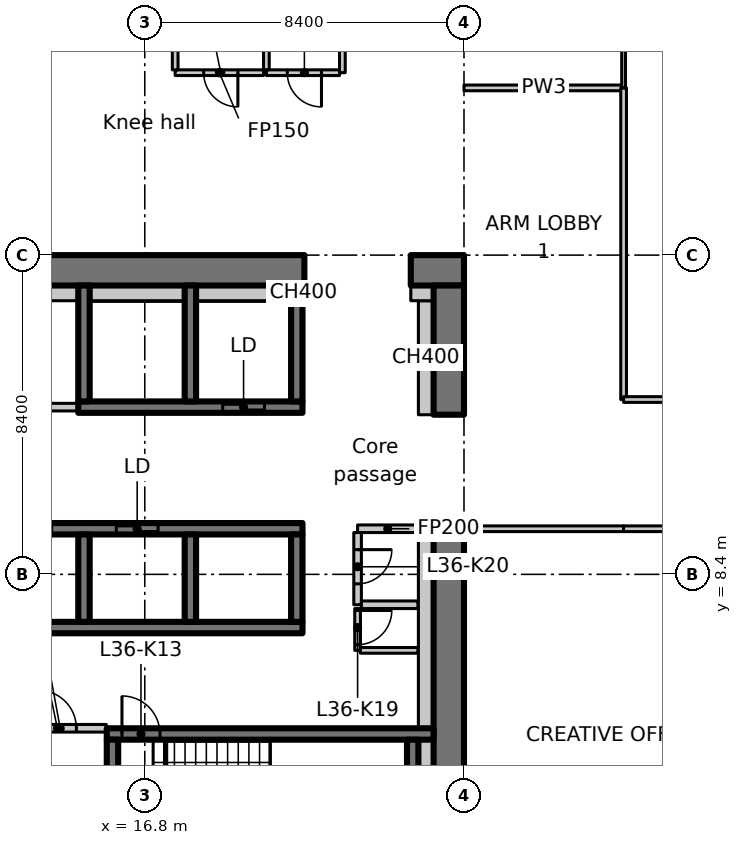
"""IFC4 building model, lengths in metres.
Left out: names, types, materials, properties, quantities, classifications, styles, units other than length and angle.
Written with IfcOpenShell. Run it as: python <this file> out.ifc"""

import sys

from ifc_helpers import new_model, si_unit, direction, frame, frame_2d, origin, place, context, subcontext, project, spatial, polyline, rectangle, outline, extrude, element, fill, save


model = new_model("IFC4")
c1 = context("Model", 3, precision=1e-05, world=origin(), true_north=direction((0.0, 1.0)))
c2 = subcontext(c1, "Body", "Model", "MODEL_VIEW")
j1 = project(units=[si_unit("LENGTHUNIT", "METRE"), si_unit("PLANEANGLEUNIT", "RADIAN")], contexts=[c1])
p1 = place(None, origin())
s1 = spatial("IfcSite", under=j1, at=p1, CompositionType="ELEMENT")
p2 = place(p1, origin())
s2 = spatial("IfcBuilding", under=s1, at=p2, CompositionType="ELEMENT")
p3 = place(p2, frame((0.0, 0.0, 145.7)))
s3 = spatial("IfcBuildingStorey", under=s2, at=p3, CompositionType="ELEMENT", Elevation=145.7)
p4 = place(p3, frame((-1.1, 16.4, 0.0), z_axis=(0.0, 0.0, 1.0), x_axis=(1.0, 0.0, 0.0)))
e1 = element("IfcWall", 1, at=p4, inside=s3, PredefinedType="SHEAR", context=c2, shape_type="SweptSolid", body=[
    extrude(rectangle(XDim=22.1, YDim=0.8, at=frame_2d((11.05, 0.0))), origin(), (0.0, 0.0, 1.0), 3.35),
])
p5 = place(p4, frame((3.15, 0.0, 0.0)))
e2 = element("IfcOpeningElement", 2, at=p5, cuts=e1, PredefinedType="OPENING", context=c2, shape_type="SweptSolid", body=[
    extrude(rectangle(XDim=1.1, YDim=2.3, at=frame_2d((0.55, 1.15))), frame((0.0, 0.41, 0.0), z_axis=(0.0, -1.0, 0.0), x_axis=(1.0, 0.0, 0.0)), (0.0, 0.0, 1.0), 0.82),
])
p6 = place(p3, frame((23.8, 16.4, 0.0), z_axis=(0.0, 0.0, 1.0), x_axis=(1.0, 0.0, 0.0)))
e3 = element("IfcWall", 3, at=p6, inside=s3, PredefinedType="SHEAR", context=c2, shape_type="SweptSolid", body=[
    extrude(rectangle(XDim=1.4, YDim=0.8, at=frame_2d((0.7, 0.0))), origin(), (0.0, 0.0, 1.0), 3.35),
])
p7 = place(p3, frame((24.8, 0.8, 0.0), z_axis=(0.0, 0.0, 1.0), x_axis=(0.0, 1.0, 0.0)))
e4 = element("IfcWall", 4, at=p7, inside=s3, PredefinedType="SHEAR", context=c2, shape_type="SweptSolid", body=[
    extrude(rectangle(XDim=9.0, YDim=0.8, at=frame_2d((4.5, 0.0))), origin(), (0.0, 0.0, 1.0), 3.35),
])
p8 = place(p3, frame((24.8, 12.6, 0.0), z_axis=(0.0, 0.0, 1.0), x_axis=(0.0, 1.0, 0.0)))
e5 = element("IfcWall", 5, at=p8, inside=s3, PredefinedType="SHEAR", context=c2, shape_type="SweptSolid", body=[
    extrude(rectangle(XDim=3.4, YDim=0.8, at=frame_2d((1.7, 0.0))), origin(), (0.0, 0.0, 1.0), 3.35),
])
p9 = place(p3, frame((24.2, 12.6, 0.0), z_axis=(0.0, 0.0, 1.0), x_axis=(0.0, 1.0, 0.0)))
e6 = element("IfcWall", 6, at=p9, inside=s3, PredefinedType="PARTITIONING", context=c2, shape_type="SweptSolid", body=[
    extrude(rectangle(XDim=3.0, YDim=0.4, at=frame_2d((1.5, 0.0))), origin(), (0.0, 0.0, 1.0), 3.35),
])
p10 = place(p3, frame((23.8, 15.8, 0.0), z_axis=(0.0, 0.0, 1.0), x_axis=(1.0, 0.0, 0.0)))
e7 = element("IfcWall", 7, at=p10, inside=s3, PredefinedType="PARTITIONING", context=c2, shape_type="SweptSolid", body=[
    extrude(rectangle(XDim=0.6, YDim=0.4, at=frame_2d((0.3, 0.0))), origin(), (0.0, 0.0, 1.0), 3.35),
])
p11 = place(p3, frame((0.8, 7.0, 0.0), z_axis=(0.0, 0.0, 1.0), x_axis=(1.0, 0.0, 0.0)))
e8 = element("IfcWall", 8, at=p11, inside=s3, PredefinedType="SHEAR", context=c2, shape_type="SweptSolid", body=[
    extrude(rectangle(XDim=20.15, YDim=0.3, at=frame_2d((10.075, 0.0))), origin(), (0.0, 0.0, 1.0), 3.35),
])
p12 = place(p3, frame((0.8, 9.6, 0.0), z_axis=(0.0, 0.0, 1.0), x_axis=(1.0, 0.0, 0.0)))
e9 = element("IfcWall", 9, at=p12, inside=s3, PredefinedType="SHEAR", context=c2, shape_type="SweptSolid", body=[
    extrude(rectangle(XDim=20.15, YDim=0.3, at=frame_2d((10.075, 0.0))), origin(), (0.0, 0.0, 1.0), 3.35),
])
p13 = place(p12, frame((1.25, 0.0, 0.0)))
e10 = element("IfcOpeningElement", 10, at=p13, cuts=e9, PredefinedType="OPENING", context=c2, shape_type="SweptSolid", body=[
    extrude(rectangle(XDim=1.1, YDim=2.3, at=frame_2d((0.55, 1.15))), frame((0.0, 0.16, 0.0), z_axis=(0.0, -1.0, 0.0), x_axis=(1.0, 0.0, 0.0)), (0.0, 0.0, 1.0), 0.32),
])
p14 = place(p12, frame((4.05, 0.0, 0.0)))
e11 = element("IfcOpeningElement", 11, at=p14, cuts=e9, PredefinedType="OPENING", context=c2, shape_type="SweptSolid", body=[
    extrude(rectangle(XDim=1.1, YDim=2.3, at=frame_2d((0.55, 1.15))), frame((0.0, 0.16, 0.0), z_axis=(0.0, -1.0, 0.0), x_axis=(1.0, 0.0, 0.0)), (0.0, 0.0, 1.0), 0.32),
])
p15 = place(p12, frame((6.85, 0.0, 0.0)))
e12 = element("IfcOpeningElement", 12, at=p15, cuts=e9, PredefinedType="OPENING", context=c2, shape_type="SweptSolid", body=[
    extrude(rectangle(XDim=1.1, YDim=2.3, at=frame_2d((0.55, 1.15))), frame((0.0, 0.16, 0.0), z_axis=(0.0, -1.0, 0.0), x_axis=(1.0, 0.0, 0.0)), (0.0, 0.0, 1.0), 0.32),
])
p16 = place(p12, frame((9.65, 0.0, 0.0)))
e13 = element("IfcOpeningElement", 13, at=p16, cuts=e9, PredefinedType="OPENING", context=c2, shape_type="SweptSolid", body=[
    extrude(rectangle(XDim=1.1, YDim=2.3, at=frame_2d((0.55, 1.15))), frame((0.0, 0.16, 0.0), z_axis=(0.0, -1.0, 0.0), x_axis=(1.0, 0.0, 0.0)), (0.0, 0.0, 1.0), 0.32),
])
p17 = place(p12, frame((12.45, 0.0, 0.0)))
e14 = element("IfcOpeningElement", 14, at=p17, cuts=e9, PredefinedType="OPENING", context=c2, shape_type="SweptSolid", body=[
    extrude(rectangle(XDim=1.1, YDim=2.3, at=frame_2d((0.55, 1.15))), frame((0.0, 0.16, 0.0), z_axis=(0.0, -1.0, 0.0), x_axis=(1.0, 0.0, 0.0)), (0.0, 0.0, 1.0), 0.32),
])
p18 = place(p12, frame((15.25, 0.0, 0.0)))
e15 = element("IfcOpeningElement", 15, at=p18, cuts=e9, PredefinedType="OPENING", context=c2, shape_type="SweptSolid", body=[
    extrude(rectangle(XDim=1.1, YDim=2.3, at=frame_2d((0.55, 1.15))), frame((0.0, 0.16, 0.0), z_axis=(0.0, -1.0, 0.0), x_axis=(1.0, 0.0, 0.0)), (0.0, 0.0, 1.0), 0.32),
])
for number, where, z_axis, x_axis in (
    (16, (15.2, 7.15, 0.0), (0.0, 0.0, 1.0), (0.0, 1.0, 0.0)),
    (17, (18.0, 7.15, 0.0), (0.0, 0.0, 1.0), (0.0, 1.0, 0.0)),
    (18, (20.8, 7.15, 0.0), (0.0, 0.0, 1.0), (0.0, 1.0, 0.0)),
):
    element("IfcWall", number, at=place(p3, frame(where, z_axis=z_axis, x_axis=x_axis)), inside=s3, PredefinedType="SHEAR", context=c2, shape_type="SweptSolid", body=[
        extrude(rectangle(XDim=2.3, YDim=0.3, at=frame_2d((1.15, 0.0))), origin(), (0.0, 0.0, 1.0), 3.35),
    ])
p19 = place(p3, frame((15.05, 12.8, 0.0), z_axis=(0.0, 0.0, 1.0), x_axis=(1.0, 0.0, 0.0)))
e19 = element("IfcWall", 19, at=p19, inside=s3, PredefinedType="SHEAR", context=c2, shape_type="SweptSolid", body=[
    extrude(rectangle(XDim=5.9, YDim=0.3, at=frame_2d((2.95, 0.0))), origin(), (0.0, 0.0, 1.0), 3.35),
])
p20 = place(p19, frame((3.8, 0.0, 0.0)))
e20 = element("IfcOpeningElement", 20, at=p20, cuts=e19, PredefinedType="OPENING", context=c2, shape_type="SweptSolid", body=[
    extrude(rectangle(XDim=1.1, YDim=2.3, at=frame_2d((0.55, 1.15))), frame((0.0, 0.16, 0.0), z_axis=(0.0, -1.0, 0.0), x_axis=(1.0, 0.0, 0.0)), (0.0, 0.0, 1.0), 0.32),
])
for number, where, z_axis, x_axis in (
    (21, (15.2, 12.95, 0.0), (0.0, 0.0, 1.0), (0.0, 1.0, 0.0)),
    (22, (18.0, 12.95, 0.0), (0.0, 0.0, 1.0), (0.0, 1.0, 0.0)),
    (23, (20.8, 12.95, 0.0), (0.0, 0.0, 1.0), (0.0, 1.0, 0.0)),
):
    element("IfcWall", number, at=place(p3, frame(where, z_axis=z_axis, x_axis=x_axis)), inside=s3, PredefinedType="SHEAR", context=c2, shape_type="SweptSolid", body=[
        extrude(rectangle(XDim=3.05, YDim=0.3, at=frame_2d((1.525, 0.0))), origin(), (0.0, 0.0, 1.0), 3.35),
    ])
p21 = place(p3, frame((15.8, 4.2, 0.0), z_axis=(0.0, 0.0, 1.0), x_axis=(1.0, 0.0, 0.0)))
e24 = element("IfcWall", 24, at=p21, inside=s3, PredefinedType="SHEAR", context=c2, shape_type="SweptSolid", body=[
    extrude(rectangle(XDim=8.6, YDim=0.3, at=frame_2d((4.3, 0.0))), origin(), (0.0, 0.0, 1.0), 3.35),
])
p22 = place(p21, frame((0.4, 0.0, 0.0)))
e25 = element("IfcOpeningElement", 25, at=p22, cuts=e24, PredefinedType="OPENING", context=c2, shape_type="SweptSolid", body=[
    extrude(rectangle(XDim=1.0, YDim=2.1, at=frame_2d((0.5, 1.05))), frame((0.0, 0.16, 0.0), z_axis=(0.0, -1.0, 0.0), x_axis=(1.0, 0.0, 0.0)), (0.0, 0.0, 1.0), 0.32),
])
p23 = place(p3, frame((15.95, 1.5, 0.0), z_axis=(0.0, 0.0, 1.0), x_axis=(0.0, 1.0, 0.0)))
e26 = element("IfcWall", 26, at=p23, inside=s3, PredefinedType="SHEAR", context=c2, shape_type="SweptSolid", body=[
    extrude(rectangle(XDim=2.55, YDim=0.3, at=frame_2d((1.275, 0.0))), origin(), (0.0, 0.0, 1.0), 3.35),
])
p24 = place(p23, frame((0.8, 0.0, 0.0)))
e27 = element("IfcOpeningElement", 27, at=p24, cuts=e26, PredefinedType="OPENING", context=c2, shape_type="SweptSolid", body=[
    extrude(rectangle(XDim=1.0, YDim=2.1, at=frame_2d((0.5, 1.05))), frame((0.0, 0.16, 0.0), z_axis=(0.0, -1.0, 0.0), x_axis=(1.0, 0.0, 0.0)), (0.0, 0.0, 1.0), 0.32),
])
p25 = place(p3, frame((23.85, 1.5, 0.0), z_axis=(0.0, 0.0, 1.0), x_axis=(0.0, 1.0, 0.0)))
e28 = element("IfcWall", 28, at=p25, inside=s3, PredefinedType="SHEAR", context=c2, shape_type="SweptSolid", body=[
    extrude(rectangle(XDim=2.55, YDim=0.3, at=frame_2d((1.275, 0.0))), origin(), (0.0, 0.0, 1.0), 3.35),
])
p26 = place(p3, frame((13.362, 4.35, 0.0), z_axis=(0.0, 0.0, 1.0), x_axis=(1.0, 0.0, 0.0)))
e29 = element("IfcWall", 29, at=p26, inside=s3, PredefinedType="PARTITIONING", context=c2, shape_type="SweptSolid", body=[
    extrude(rectangle(XDim=2.426, YDim=0.2, at=frame_2d((1.213, 0.0))), origin(), (0.0, 0.0, 1.0), 3.35),
])
p27 = place(p26, frame((0.638, 0.0, 0.0)))
e30 = element("IfcOpeningElement", 30, at=p27, cuts=e29, PredefinedType="OPENING", context=c2, shape_type="SweptSolid", body=[
    extrude(rectangle(XDim=1.0, YDim=2.1, at=frame_2d((0.5, 1.05))), frame((0.0, 0.11, 0.0), z_axis=(0.0, -1.0, 0.0), x_axis=(1.0, 0.0, 0.0)), (0.0, 0.0, 1.0), 0.22),
])
p28 = place(p3, frame((9.7, 12.8, 0.0), z_axis=(0.0, 0.0, 1.0), x_axis=(1.0, 0.0, 0.0)))
e31 = element("IfcWall", 31, at=p28, inside=s3, PredefinedType="PARTITIONING", context=c2, shape_type="SweptSolid", body=[
    extrude(rectangle(XDim=5.338, YDim=0.2, at=frame_2d((2.669, 0.0))), origin(), (0.0, 0.0, 1.0), 3.35),
])
p29 = place(p28, frame((2.25, 0.0, 0.0)))
e32 = element("IfcOpeningElement", 32, at=p29, cuts=e31, PredefinedType="OPENING", context=c2, shape_type="SweptSolid", body=[
    extrude(rectangle(XDim=0.9, YDim=2.1, at=frame_2d((0.45, 1.05))), frame((0.0, 0.11, 0.0), z_axis=(0.0, -1.0, 0.0), x_axis=(1.0, 0.0, 0.0)), (0.0, 0.0, 1.0), 0.22),
])
p30 = place(p3, frame((23.988, 9.6, 0.0), z_axis=(0.0, 0.0, 1.0), x_axis=(-1.0, 0.0, 0.0)))
e33 = element("IfcWall", 33, at=p30, inside=s3, PredefinedType="PARTITIONING", context=c2, shape_type="SweptSolid", body=[
    extrude(rectangle(XDim=1.588, YDim=0.2, at=frame_2d((0.794, 0.0))), origin(), (0.0, 0.0, 1.0), 3.35),
])
p31 = place(p3, frame((22.4, 9.5, 0.0), z_axis=(0.0, 0.0, 1.0), x_axis=(0.0, -1.0, 0.0)))
e34 = element("IfcWall", 34, at=p31, inside=s3, PredefinedType="PARTITIONING", context=c2, shape_type="SweptSolid", body=[
    extrude(rectangle(XDim=1.9, YDim=0.2, at=frame_2d((0.95, 0.0))), origin(), (0.0, 0.0, 1.0), 3.35),
])
p32 = place(p31, frame((0.45, 0.0, 0.0)))
e35 = element("IfcOpeningElement", 35, at=p32, cuts=e34, PredefinedType="OPENING", context=c2, shape_type="SweptSolid", body=[
    extrude(rectangle(XDim=0.9, YDim=2.1, at=frame_2d((0.45, 1.05))), frame((0.0, 0.11, 0.0), z_axis=(0.0, -1.0, 0.0), x_axis=(1.0, 0.0, 0.0)), (0.0, 0.0, 1.0), 0.22),
])
p33 = place(p3, frame((22.5, 7.6, 0.0), z_axis=(0.0, 0.0, 1.0), x_axis=(1.0, 0.0, 0.0)))
e36 = element("IfcWall", 36, at=p33, inside=s3, PredefinedType="PARTITIONING", context=c2, shape_type="SweptSolid", body=[
    extrude(rectangle(XDim=1.488, YDim=0.2, at=frame_2d((0.744, 0.0))), origin(), (0.0, 0.0, 1.0), 3.35),
])
p34 = place(p3, frame((22.0, 23.925, 0.0), z_axis=(0.0, 0.0, 1.0), x_axis=(0.0, -1.0, 0.0)))
e37 = element("IfcWall", 37, at=p34, inside=s3, PredefinedType="PARTITIONING", context=c2, shape_type="SweptSolid", body=[
    extrude(rectangle(XDim=2.325, YDim=0.15, at=frame_2d((1.163, 0.0))), origin(), (0.0, 0.0, 1.0), 3.35),
])
p35 = place(p3, frame((21.925, 21.6, 0.0), z_axis=(0.0, 0.0, 1.0), x_axis=(-1.0, 0.0, 0.0)))
e38 = element("IfcWall", 38, at=p35, inside=s3, PredefinedType="PARTITIONING", context=c2, shape_type="SweptSolid", body=[
    extrude(rectangle(XDim=1.925, YDim=0.15, at=frame_2d((0.962, 0.0))), origin(), (0.0, 0.0, 1.0), 3.35),
])
p36 = place(p35, frame((0.475, 0.0, 0.0)))
e39 = element("IfcOpeningElement", 39, at=p36, cuts=e38, PredefinedType="OPENING", context=c2, shape_type="SweptSolid", body=[
    extrude(rectangle(XDim=0.9, YDim=2.1, at=frame_2d((0.45, 1.05))), frame((0.0, 0.085, 0.0), z_axis=(0.0, -1.0, 0.0), x_axis=(1.0, 0.0, 0.0)), (0.0, 0.0, 1.0), 0.17),
])
p37 = place(p3, frame((20.0, 21.675, 0.0), z_axis=(0.0, 0.0, 1.0), x_axis=(0.0, 1.0, 0.0)))
e40 = element("IfcWall", 40, at=p37, inside=s3, PredefinedType="PARTITIONING", context=c2, shape_type="SweptSolid", body=[
    extrude(rectangle(XDim=2.25, YDim=0.15, at=frame_2d((1.125, 0.0))), origin(), (0.0, 0.0, 1.0), 3.35),
])
p38 = place(p3, frame((19.925, 21.6, 0.0), z_axis=(0.0, 0.0, 1.0), x_axis=(-1.0, 0.0, 0.0)))
e41 = element("IfcWall", 41, at=p38, inside=s3, PredefinedType="PARTITIONING", context=c2, shape_type="SweptSolid", body=[
    extrude(rectangle(XDim=2.325, YDim=0.15, at=frame_2d((1.163, 0.0))), origin(), (0.0, 0.0, 1.0), 3.35),
])
p39 = place(p38, frame((0.675, 0.0, 0.0)))
e42 = element("IfcOpeningElement", 42, at=p39, cuts=e41, PredefinedType="OPENING", context=c2, shape_type="SweptSolid", body=[
    extrude(rectangle(XDim=0.9, YDim=2.1, at=frame_2d((0.45, 1.05))), frame((0.0, 0.085, 0.0), z_axis=(0.0, -1.0, 0.0), x_axis=(1.0, 0.0, 0.0)), (0.0, 0.0, 1.0), 0.17),
])
p40 = place(p3, frame((17.6, 21.675, 0.0), z_axis=(0.0, 0.0, 1.0), x_axis=(0.0, 1.0, 0.0)))
e43 = element("IfcWall", 43, at=p40, inside=s3, PredefinedType="PARTITIONING", context=c2, shape_type="SweptSolid", body=[
    extrude(rectangle(XDim=2.325, YDim=0.15, at=frame_2d((1.163, 0.0))), origin(), (0.0, 0.0, 1.0), 3.35),
])
p41 = place(p3, frame((22.4, 7.5, 0.0), z_axis=(0.0, 0.0, 1.0), x_axis=(0.0, -1.0, 0.0)))
e44 = element("IfcWall", 44, at=p41, inside=s3, PredefinedType="PARTITIONING", context=c2, shape_type="SweptSolid", body=[
    extrude(rectangle(XDim=1.1, YDim=0.15, at=frame_2d((0.55, 0.0))), origin(), (0.0, 0.0, 1.0), 3.35),
])
p42 = place(p41, frame((0.05, 0.0, 0.0)))
e45 = element("IfcOpeningElement", 45, at=p42, cuts=e44, PredefinedType="OPENING", context=c2, shape_type="SweptSolid", body=[
    extrude(rectangle(XDim=0.9, YDim=2.1, at=frame_2d((0.45, 1.05))), frame((0.0, 0.085, 0.0), z_axis=(0.0, -1.0, 0.0), x_axis=(1.0, 0.0, 0.0)), (0.0, 0.0, 1.0), 0.17),
])
p43 = place(p3, frame((22.475, 6.4, 0.0), z_axis=(0.0, 0.0, 1.0), x_axis=(1.0, 0.0, 0.0)))
e46 = element("IfcWall", 46, at=p43, inside=s3, PredefinedType="PARTITIONING", context=c2, shape_type="SweptSolid", body=[
    extrude(rectangle(XDim=1.513, YDim=0.15, at=frame_2d((0.756, 0.0))), origin(), (0.0, 0.0, 1.0), 3.35),
])
p44 = place(p3, frame((4.15, 15.8, 0.0), z_axis=(0.0, 0.0, 1.0), x_axis=(1.0, 0.0, 0.0)))
e47 = element("IfcWall", 47, at=p44, inside=s3, PredefinedType="PARTITIONING", context=c2, shape_type="SweptSolid", body=[
    extrude(rectangle(XDim=10.9, YDim=0.4, at=frame_2d((5.45, 0.0))), origin(), (0.0, 0.0, 1.0), 3.35),
])
for number, where, z_axis, x_axis in (
    (48, (15.35, 15.8, 0.0), (0.0, 0.0, 1.0), (1.0, 0.0, 0.0)),
    (49, (18.15, 15.8, 0.0), (0.0, 0.0, 1.0), (1.0, 0.0, 0.0)),
):
    element("IfcWall", number, at=place(p3, frame(where, z_axis=z_axis, x_axis=x_axis)), inside=s3, PredefinedType="PARTITIONING", context=c2, shape_type="SweptSolid", body=[
        extrude(rectangle(XDim=2.5, YDim=0.4, at=frame_2d((1.25, 0.0))), origin(), (0.0, 0.0, 1.0), 3.35),
    ])
p45 = place(p3, frame((20.95, 15.8, 0.0), z_axis=(0.0, 0.0, 1.0), x_axis=(1.0, 0.0, 0.0)))
e50 = element("IfcWall", 50, at=p45, inside=s3, PredefinedType="PARTITIONING", context=c2, shape_type="SweptSolid", body=[
    extrude(rectangle(XDim=0.05, YDim=0.4, at=frame_2d((0.025, 0.0))), origin(), (0.0, 0.0, 1.0), 3.35),
])
p46 = place(p3, frame((24.2, 1.5, 0.0), z_axis=(0.0, 0.0, 1.0), x_axis=(0.0, 1.0, 0.0)))
e51 = element("IfcWall", 51, at=p46, inside=s3, PredefinedType="PARTITIONING", context=c2, shape_type="SweptSolid", body=[
    extrude(rectangle(XDim=2.55, YDim=0.4, at=frame_2d((1.275, 0.0))), origin(), (0.0, 0.0, 1.0), 3.35),
])
p47 = place(p3, frame((24.2, 4.35, 0.0), z_axis=(0.0, 0.0, 1.0), x_axis=(0.0, 1.0, 0.0)))
e52 = element("IfcWall", 52, at=p47, inside=s3, PredefinedType="PARTITIONING", context=c2, shape_type="SweptSolid", body=[
    extrude(rectangle(XDim=5.45, YDim=0.4, at=frame_2d((2.725, 0.0))), origin(), (0.0, 0.0, 1.0), 3.35),
])
for number, where, z_axis, x_axis in (
    (53, (25.2, 21.2, 0.0), (0.0, 0.0, 1.0), (1.0, 0.0, 0.0)),
    (54, (29.4, 9.6, 0.0), (0.0, 0.0, 1.0), (-1.0, 0.0, 0.0)),
):
    element("IfcWall", number, at=place(p3, frame(where, z_axis=z_axis, x_axis=x_axis)), inside=s3, PredefinedType="PARTITIONING", context=c2, shape_type="SweptSolid", body=[
        extrude(rectangle(XDim=4.2, YDim=0.15, at=frame_2d((2.1, 0.0))), origin(), (0.0, 0.0, 1.0), 3.33),
    ])
p48 = place(p3, frame((29.4, 21.2, 0.0), z_axis=(0.0, 0.0, 1.0), x_axis=(0.0, -1.0, 0.0)))
e55 = element("IfcWall", 55, at=p48, inside=s3, PredefinedType="PARTITIONING", context=c2, shape_type="SweptSolid", body=[
    extrude(rectangle(XDim=8.2, YDim=0.15, at=frame_2d((4.1, 0.0))), origin(), (0.0, 0.0, 1.0), 3.33),
])
p49 = place(p3, frame((29.4, 27.429, 0.0), z_axis=(0.0, 0.0, 1.0), x_axis=(0.0, -1.0, 0.0)))
e56 = element("IfcWall", 56, at=p49, inside=s3, PredefinedType="PARTITIONING", context=c2, shape_type="SweptSolid", body=[
    extrude(outline(polyline([(0.0, 0.0), (6.229, 0.0), (6.229, 3.33), (2.679, 3.33), (2.677, 2.98), (1.781, 2.98), (1.779, 3.33), (0.154, 3.33), (0.0, 3.33), (0.0, 0.0)])), frame((0.0, 0.05, 0.0), z_axis=(0.0, -1.0, 0.0), x_axis=(1.0, 0.0, 0.0)), (0.0, 0.0, 1.0), 0.1),
])
p50 = place(p3, frame((33.6, 9.6, 0.0), z_axis=(0.0, 0.0, 1.0), x_axis=(-1.0, 0.0, 0.0)))
e57 = element("IfcWall", 57, at=p50, inside=s3, PredefinedType="PARTITIONING", context=c2, shape_type="SweptSolid", body=[
    extrude(rectangle(XDim=4.2, YDim=0.15, at=frame_2d((2.1, 0.0))), origin(), (0.0, 0.0, 1.0), 3.33),
])
p51 = place(p50, frame((1.2, 0.0, 0.0)))
e58 = element("IfcOpeningElement", 58, at=p51, cuts=e57, PredefinedType="OPENING", context=c2, shape_type="SweptSolid", body=[
    extrude(rectangle(XDim=1.6, YDim=2.1, at=frame_2d((0.8, 1.05))), frame((0.0, 0.085, 0.0), z_axis=(0.0, -1.0, 0.0), x_axis=(1.0, 0.0, 0.0)), (0.0, 0.0, 1.0), 0.17),
])
p52 = place(p3, frame((29.4, 13.0, 0.0), z_axis=(0.0, 0.0, 1.0), x_axis=(1.0, 0.0, 0.0)))
e59 = element("IfcWall", 59, at=p52, inside=s3, PredefinedType="PARTITIONING", context=c2, shape_type="SweptSolid", body=[
    extrude(rectangle(XDim=8.4, YDim=0.15, at=frame_2d((4.2, 0.0))), origin(), (0.0, 0.0, 1.0), 3.33),
])
p53 = place(p52, frame((3.3, 0.0, 0.0)))
e60 = element("IfcOpeningElement", 60, at=p53, cuts=e59, PredefinedType="OPENING", context=c2, shape_type="SweptSolid", body=[
    extrude(rectangle(XDim=1.8, YDim=2.1, at=frame_2d((0.9, 1.05))), frame((0.0, 0.085, 0.0), z_axis=(0.0, -1.0, 0.0), x_axis=(1.0, 0.0, 0.0)), (0.0, 0.0, 1.0), 0.17),
])
p54 = place(p18, origin())
e61 = element("IfcDoor", 61, at=p54, inside=s3, OperationType="SLIDING_TO_LEFT", PredefinedType="DOOR", context=c2, shape_type="SweptSolid", body=[
    extrude(rectangle(XDim=1.1, YDim=2.3, at=frame_2d((0.55, 1.15))), frame((0.0, 0.025, 0.0), z_axis=(0.0, -1.0, 0.0), x_axis=(1.0, 0.0, 0.0)), (0.0, 0.0, 1.0), 0.05),
])
fill(e15, e61)
p55 = place(p20, origin())
e62 = element("IfcDoor", 62, at=p55, inside=s3, OperationType="SLIDING_TO_LEFT", PredefinedType="DOOR", context=c2, shape_type="SweptSolid", body=[
    extrude(rectangle(XDim=1.1, YDim=2.3, at=frame_2d((0.55, 1.15))), frame((0.0, 0.025, 0.0), z_axis=(0.0, -1.0, 0.0), x_axis=(1.0, 0.0, 0.0)), (0.0, 0.0, 1.0), 0.05),
])
fill(e20, e62)
p56 = place(p22, origin())
e63 = element("IfcDoor", 63, at=p56, inside=s3, OperationType="SINGLE_SWING_LEFT", PredefinedType="DOOR", context=c2, shape_type="SweptSolid", body=[
    extrude(rectangle(XDim=1.0, YDim=2.1, at=frame_2d((0.5, 1.05))), frame((0.0, 0.025, 0.0), z_axis=(0.0, -1.0, 0.0), x_axis=(1.0, 0.0, 0.0)), (0.0, 0.0, 1.0), 0.05),
])
fill(e25, e63)
p57 = place(p27, origin())
e64 = element("IfcDoor", 64, at=p57, inside=s3, OperationType="SINGLE_SWING_RIGHT", PredefinedType="DOOR", context=c2, shape_type="SweptSolid", body=[
    extrude(rectangle(XDim=1.0, YDim=2.1, at=frame_2d((0.5, 1.05))), frame((0.0, 0.025, 0.0), z_axis=(0.0, -1.0, 0.0), x_axis=(1.0, 0.0, 0.0)), (0.0, 0.0, 1.0), 0.05),
])
fill(e30, e64)
p58 = place(p42, origin())
e65 = element("IfcDoor", 65, at=p58, inside=s3, OperationType="SINGLE_SWING_LEFT", PredefinedType="DOOR", context=c2, shape_type="SweptSolid", body=[
    extrude(rectangle(XDim=0.9, YDim=2.1, at=frame_2d((0.45, 1.05))), frame((0.0, 0.025, 0.0), z_axis=(0.0, -1.0, 0.0), x_axis=(1.0, 0.0, 0.0)), (0.0, 0.0, 1.0), 0.05),
])
fill(e45, e65)
p59 = place(p32, origin())
e66 = element("IfcDoor", 66, at=p59, inside=s3, OperationType="SINGLE_SWING_RIGHT", PredefinedType="DOOR", context=c2, shape_type="SweptSolid", body=[
    extrude(rectangle(XDim=0.9, YDim=2.1, at=frame_2d((0.45, 1.05))), frame((0.0, 0.025, 0.0), z_axis=(0.0, -1.0, 0.0), x_axis=(1.0, 0.0, 0.0)), (0.0, 0.0, 1.0), 0.05),
])
fill(e35, e66)
p60 = place(p36, origin())
e67 = element("IfcDoor", 67, at=p60, inside=s3, OperationType="SINGLE_SWING_RIGHT", PredefinedType="DOOR", context=c2, shape_type="SweptSolid", body=[
    extrude(rectangle(XDim=0.9, YDim=2.1, at=frame_2d((0.45, 1.05))), frame((0.0, 0.025, 0.0), z_axis=(0.0, -1.0, 0.0), x_axis=(1.0, 0.0, 0.0)), (0.0, 0.0, 1.0), 0.05),
])
fill(e39, e67)
p61 = place(p39, origin())
e68 = element("IfcDoor", 68, at=p61, inside=s3, OperationType="SINGLE_SWING_LEFT", PredefinedType="DOOR", context=c2, shape_type="SweptSolid", body=[
    extrude(rectangle(XDim=0.9, YDim=2.1, at=frame_2d((0.45, 1.05))), frame((0.0, 0.025, 0.0), z_axis=(0.0, -1.0, 0.0), x_axis=(1.0, 0.0, 0.0)), (0.0, 0.0, 1.0), 0.05),
])
fill(e42, e68)
save(model, sys.argv[1])
